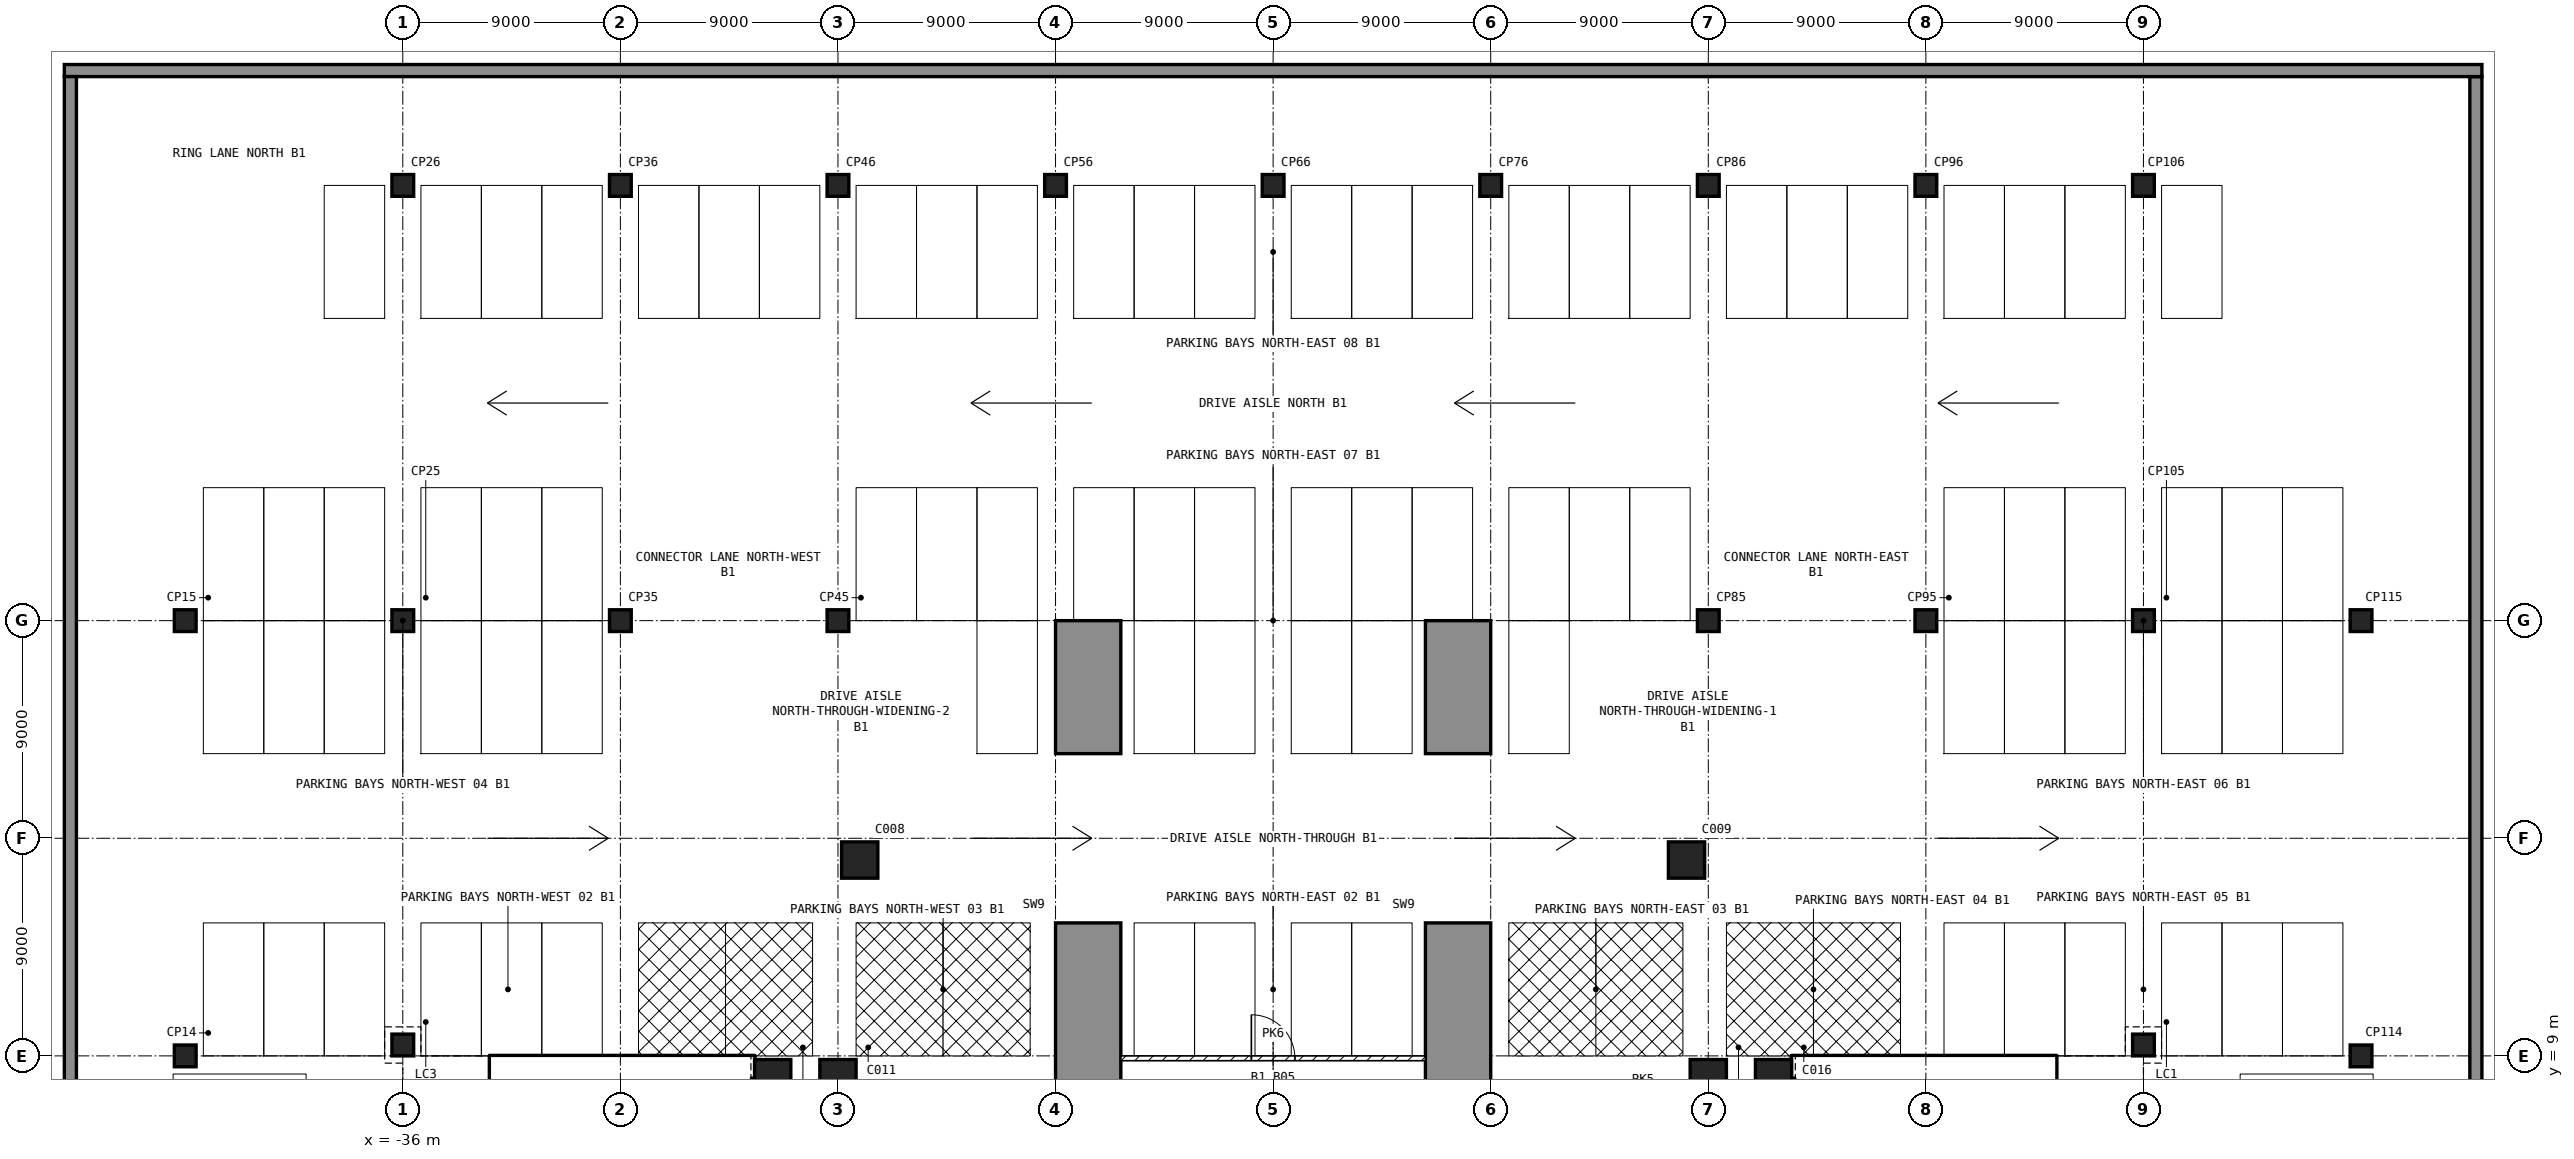
"""IFC4 building model, lengths in metres.
Left out: names, types, materials, properties, quantities, classifications, styles, units other than length and angle.
Written with IfcOpenShell. Run it as: python <this file> out.ifc"""

import sys

from ifc_helpers import new_model, si_unit, direction, frame, frame_2d, origin, origin_2d, place, context, subcontext, project, spatial, polyline, rectangle, outline, extrude, element, fill, save


model = new_model("IFC4")
c1 = context("Model", 3, precision=1e-05, world=origin(), true_north=direction((0.0, 1.0)))
c2 = subcontext(c1, "Body", "Model", "MODEL_VIEW")
j1 = project(units=[si_unit("LENGTHUNIT", "METRE"), si_unit("PLANEANGLEUNIT", "RADIAN")], contexts=[c1])
p1 = place(None, origin())
s1 = spatial("IfcSite", under=j1, at=p1, CompositionType="ELEMENT")
p2 = place(p1, origin())
s2 = spatial("IfcBuilding", under=s1, at=p2, CompositionType="ELEMENT")
p3 = place(p2, frame((0.0, 0.0, -4.5)))
s3 = spatial("IfcBuildingStorey", under=s2, at=p3, CompositionType="ELEMENT", Elevation=-4.5)
p4 = place(p3, frame((-50.0, 49.75, -0.3), z_axis=(0.0, 0.0, 1.0), x_axis=(1.0, 0.0, 0.0)))
e1 = element("IfcWall", 1, at=p4, inside=s3, PredefinedType="SOLIDWALL", context=c2, shape_type="SweptSolid", body=[
    extrude(rectangle(XDim=100.0, YDim=0.5, at=frame_2d((50.0, 0.0))), origin(), (0.0, 0.0, 1.0), 4.8),
])
for number, where, z_axis, x_axis in (
    (2, (49.75, -49.5, -0.3), (0.0, 0.0, 1.0), (0.0, 1.0, 0.0)),
    (3, (-49.75, -49.5, -0.3), (0.0, 0.0, 1.0), (0.0, 1.0, 0.0)),
):
    element("IfcWall", number, at=place(p3, frame(where, z_axis=z_axis, x_axis=x_axis)), inside=s3, PredefinedType="SOLIDWALL", context=c2, shape_type="SweptSolid", body=[
        extrude(rectangle(XDim=99.0, YDim=0.5, at=frame_2d((49.5, 0.0))), origin(), (0.0, 0.0, 1.0), 4.8),
    ])
for number, where, z_axis, x_axis in (
    (4, (-20.7, 8.1, -0.3), (0.0, 0.0, 1.0), (1.0, 0.0, 0.0)),
    (5, (-18.0, 8.1, -0.3), (0.0, 0.0, 1.0), (1.0, 0.0, 0.0)),
    (6, (18.0, 8.1, -0.3), (0.0, 0.0, 1.0), (1.0, 0.0, 0.0)),
    (7, (20.7, 8.1, -0.3), (0.0, 0.0, 1.0), (1.0, 0.0, 0.0)),
    (8, (17.1, 17.1, -0.3), (0.0, 0.0, 1.0), (1.0, 0.0, 0.0)),
    (9, (-17.1, 17.1, -0.3), (0.0, 0.0, 1.0), (1.0, 0.0, 0.0)),
):
    element("IfcColumn", number, at=place(p3, frame(where, z_axis=z_axis, x_axis=x_axis)), inside=s3, PredefinedType="COLUMN", context=c2, shape_type="SweptSolid", body=[
        extrude(rectangle(XDim=1.5, YDim=1.5, at=origin_2d()), origin(), (0.0, 0.0, 1.0), 4.4),
    ])
for number, where, z_axis, x_axis in (
    (10, (-45.0, 9.0, -0.3), (0.0, 0.0, 1.0), (1.0, 0.0, 0.0)),
    (11, (-45.0, 27.0, -0.3), (0.0, 0.0, 1.0), (1.0, 0.0, 0.0)),
    (12, (-36.0, 27.0, -0.3), (0.0, 0.0, 1.0), (1.0, 0.0, 0.0)),
    (13, (-36.0, 45.0, -0.3), (0.0, 0.0, 1.0), (1.0, 0.0, 0.0)),
    (14, (-27.0, 27.0, -0.3), (0.0, 0.0, 1.0), (1.0, 0.0, 0.0)),
    (15, (-27.0, 45.0, -0.3), (0.0, 0.0, 1.0), (1.0, 0.0, 0.0)),
    (16, (-18.0, 27.0, -0.3), (0.0, 0.0, 1.0), (1.0, 0.0, 0.0)),
    (17, (-18.0, 45.0, -0.3), (0.0, 0.0, 1.0), (1.0, 0.0, 0.0)),
    (18, (-9.0, 45.0, -0.3), (0.0, 0.0, 1.0), (1.0, 0.0, 0.0)),
    (19, (0.0, 45.0, -0.3), (0.0, 0.0, 1.0), (1.0, 0.0, 0.0)),
    (20, (9.0, 45.0, -0.3), (0.0, 0.0, 1.0), (1.0, 0.0, 0.0)),
    (21, (18.0, 27.0, -0.3), (0.0, 0.0, 1.0), (1.0, 0.0, 0.0)),
    (22, (18.0, 45.0, -0.3), (0.0, 0.0, 1.0), (1.0, 0.0, 0.0)),
    (23, (27.0, 27.0, -0.3), (0.0, 0.0, 1.0), (1.0, 0.0, 0.0)),
    (24, (27.0, 45.0, -0.3), (0.0, 0.0, 1.0), (1.0, 0.0, 0.0)),
    (25, (36.0, 27.0, -0.3), (0.0, 0.0, 1.0), (1.0, 0.0, 0.0)),
    (26, (36.0, 45.0, -0.3), (0.0, 0.0, 1.0), (1.0, 0.0, 0.0)),
    (27, (45.0, 9.0, -0.3), (0.0, 0.0, 1.0), (1.0, 0.0, 0.0)),
    (28, (45.0, 27.0, -0.3), (0.0, 0.0, 1.0), (1.0, 0.0, 0.0)),
    (29, (36.0, 9.45, -0.3), (0.0, 0.0, 1.0), (1.0, 0.0, 0.0)),
    (30, (-36.0, 9.45, -0.3), (0.0, 0.0, 1.0), (1.0, 0.0, 0.0)),
):
    element("IfcColumn", number, at=place(p3, frame(where, z_axis=z_axis, x_axis=x_axis)), inside=s3, PredefinedType="COLUMN", context=c2, shape_type="SweptSolid", body=[
        extrude(rectangle(XDim=0.9, YDim=0.9, at=origin_2d()), origin(), (0.0, 0.0, 1.0), 4.4),
    ])
for number, where, z_axis, x_axis in (
    (31, (6.3, 3.5, -0.3), (1.0, 0.0, 0.0), (0.0, 1.0, 0.0)),
    (32, (-9.0, 3.5, -0.3), (1.0, 0.0, 0.0), (0.0, 1.0, 0.0)),
):
    element("IfcWall", number, at=place(p3, frame(where, z_axis=z_axis, x_axis=x_axis)), inside=s3, PredefinedType="SOLIDWALL", context=c2, shape_type="SweptSolid", body=[
        extrude(outline(polyline([(0.0, 0.0), (11.0, 0.0), (11.0, 3.3), (18.0, 3.3), (18.0, 0.0), (23.5, 0.0), (23.5, 4.4), (0.0, 4.4), (0.0, 0.0)])), origin(), (0.0, 0.0, 1.0), 2.7),
    ])
p5 = place(p3, frame((31.95, 7.2, 0.0), z_axis=(0.0, 0.0, 1.0), x_axis=(0.0, 1.0, 0.0)))
e33 = element("IfcWall", 33, at=p5, inside=s3, PredefinedType="SHEAR", context=c2, shape_type="SweptSolid", body=[
    extrude(rectangle(XDim=1.8, YDim=0.9, at=frame_2d((0.9, 0.0))), origin(), (0.0, 0.0, 1.0), 4.1),
])
p6 = place(p3, frame((21.45, 8.55, 0.0), z_axis=(0.0, 0.0, 1.0), x_axis=(1.0, 0.0, 0.0)))
e34 = element("IfcWall", 34, at=p6, inside=s3, PredefinedType="SHEAR", context=c2, shape_type="SweptSolid", body=[
    extrude(rectangle(XDim=10.05, YDim=0.9, at=frame_2d((5.025, 0.0))), origin(), (0.0, 0.0, 1.0), 4.1),
])
p7 = place(p3, frame((21.825, 1.2, 0.0), z_axis=(0.0, 0.0, 1.0), x_axis=(0.0, 1.0, 0.0)))
e35 = element("IfcWall", 35, at=p7, inside=s3, PredefinedType="SHEAR", context=c2, shape_type="SweptSolid", body=[
    extrude(rectangle(XDim=6.9, YDim=0.45, at=frame_2d((3.45, 0.0))), origin(), (0.0, 0.0, 1.0), 4.1),
])
p8 = place(p3, frame((28.25, 5.25, 0.0), z_axis=(0.0, 0.0, 1.0), x_axis=(0.0, 1.0, 0.0)))
e36 = element("IfcWall", 36, at=p8, inside=s3, PredefinedType="SOLIDWALL", context=c2, shape_type="SweptSolid", body=[
    extrude(rectangle(XDim=2.85, YDim=0.2, at=frame_2d((1.425, 0.0))), origin(), (0.0, 0.0, 1.0), 4.1),
])
p9 = place(p3, frame((30.0, 4.05, 0.0), z_axis=(0.0, 0.0, 1.0), x_axis=(0.0, 1.0, 0.0)))
e37 = element("IfcWall", 37, at=p9, inside=s3, PredefinedType="PARTITIONING", context=c2, shape_type="SweptSolid", body=[
    extrude(rectangle(XDim=4.05, YDim=0.15, at=frame_2d((2.025, 0.0))), origin(), (0.0, 0.0, 1.0), 4.1),
])
p10 = place(p9, frame((0.1, 0.0, 0.0)))
e38 = element("IfcOpeningElement", 38, at=p10, cuts=e37, PredefinedType="OPENING", context=c2, shape_type="SweptSolid", body=[
    extrude(rectangle(XDim=0.8, YDim=2.1, at=frame_2d((0.4, 1.05))), frame((0.0, 0.085, 0.0), z_axis=(0.0, -1.0, 0.0), x_axis=(1.0, 0.0, 0.0)), (0.0, 0.0, 1.0), 0.17),
])
p11 = place(p3, frame((-31.95, 7.2, 0.0), z_axis=(0.0, 0.0, 1.0), x_axis=(0.0, 1.0, 0.0)))
e39 = element("IfcWall", 39, at=p11, inside=s3, PredefinedType="SHEAR", context=c2, shape_type="SweptSolid", body=[
    extrude(rectangle(XDim=1.8, YDim=0.9, at=frame_2d((0.9, 0.0))), origin(), (0.0, 0.0, 1.0), 4.1),
])
p12 = place(p3, frame((-31.5, 8.55, 0.0), z_axis=(0.0, 0.0, 1.0), x_axis=(1.0, 0.0, 0.0)))
e40 = element("IfcWall", 40, at=p12, inside=s3, PredefinedType="SHEAR", context=c2, shape_type="SweptSolid", body=[
    extrude(rectangle(XDim=10.05, YDim=0.9, at=frame_2d((5.025, 0.0))), origin(), (0.0, 0.0, 1.0), 4.1),
])
p13 = place(p3, frame((-21.825, 1.2, 0.0), z_axis=(0.0, 0.0, 1.0), x_axis=(0.0, 1.0, 0.0)))
e41 = element("IfcWall", 41, at=p13, inside=s3, PredefinedType="SHEAR", context=c2, shape_type="SweptSolid", body=[
    extrude(rectangle(XDim=6.9, YDim=0.45, at=frame_2d((3.45, 0.0))), origin(), (0.0, 0.0, 1.0), 4.1),
])
p14 = place(p3, frame((-28.25, 5.25, 0.0), z_axis=(0.0, 0.0, 1.0), x_axis=(0.0, 1.0, 0.0)))
e42 = element("IfcWall", 42, at=p14, inside=s3, PredefinedType="SOLIDWALL", context=c2, shape_type="SweptSolid", body=[
    extrude(rectangle(XDim=2.85, YDim=0.2, at=frame_2d((1.425, 0.0))), origin(), (0.0, 0.0, 1.0), 4.1),
])
p15 = place(p3, frame((-30.0, 4.05, 0.0), z_axis=(0.0, 0.0, 1.0), x_axis=(0.0, 1.0, 0.0)))
e43 = element("IfcWall", 43, at=p15, inside=s3, PredefinedType="PARTITIONING", context=c2, shape_type="SweptSolid", body=[
    extrude(rectangle(XDim=4.05, YDim=0.15, at=frame_2d((2.025, 0.0))), origin(), (0.0, 0.0, 1.0), 4.1),
])
p16 = place(p15, frame((0.1, 0.0, 0.0)))
e44 = element("IfcOpeningElement", 44, at=p16, cuts=e43, PredefinedType="OPENING", context=c2, shape_type="SweptSolid", body=[
    extrude(rectangle(XDim=0.8, YDim=2.1, at=frame_2d((0.4, 1.05))), frame((0.0, 0.085, 0.0), z_axis=(0.0, -1.0, 0.0), x_axis=(1.0, 0.0, 0.0)), (0.0, 0.0, 1.0), 0.17),
])
p17 = place(p3, frame((-6.3, 8.9, 0.0), z_axis=(0.0, 0.0, 1.0), x_axis=(1.0, 0.0, 0.0)))
e45 = element("IfcWall", 45, at=p17, inside=s3, PredefinedType="PARTITIONING", context=c2, shape_type="SweptSolid", body=[
    extrude(rectangle(XDim=12.6, YDim=0.2, at=frame_2d((6.3, 0.0))), origin(), (0.0, 0.0, 1.0), 4.1),
])
p18 = place(p17, frame((5.4, 0.0, 0.0)))
e46 = element("IfcOpeningElement", 46, at=p18, cuts=e45, PredefinedType="OPENING", context=c2, shape_type="SweptSolid", body=[
    extrude(rectangle(XDim=1.8, YDim=2.1, at=frame_2d((0.9, 1.05))), frame((0.0, 0.11, 0.0), z_axis=(0.0, -1.0, 0.0), x_axis=(1.0, 0.0, 0.0)), (0.0, 0.0, 1.0), 0.22),
])
p19 = place(p18, origin())
e47 = element("IfcDoor", 47, at=p19, inside=s3, OperationType="SINGLE_SWING_LEFT", PredefinedType="DOOR", context=c2, shape_type="SweptSolid", body=[
    extrude(rectangle(XDim=1.8, YDim=2.1, at=frame_2d((0.9, 1.05))), frame((0.0, 0.025, 0.0), z_axis=(0.0, -1.0, 0.0), x_axis=(1.0, 0.0, 0.0)), (0.0, 0.0, 1.0), 0.05),
])
fill(e46, e47)
save(model, sys.argv[1])
